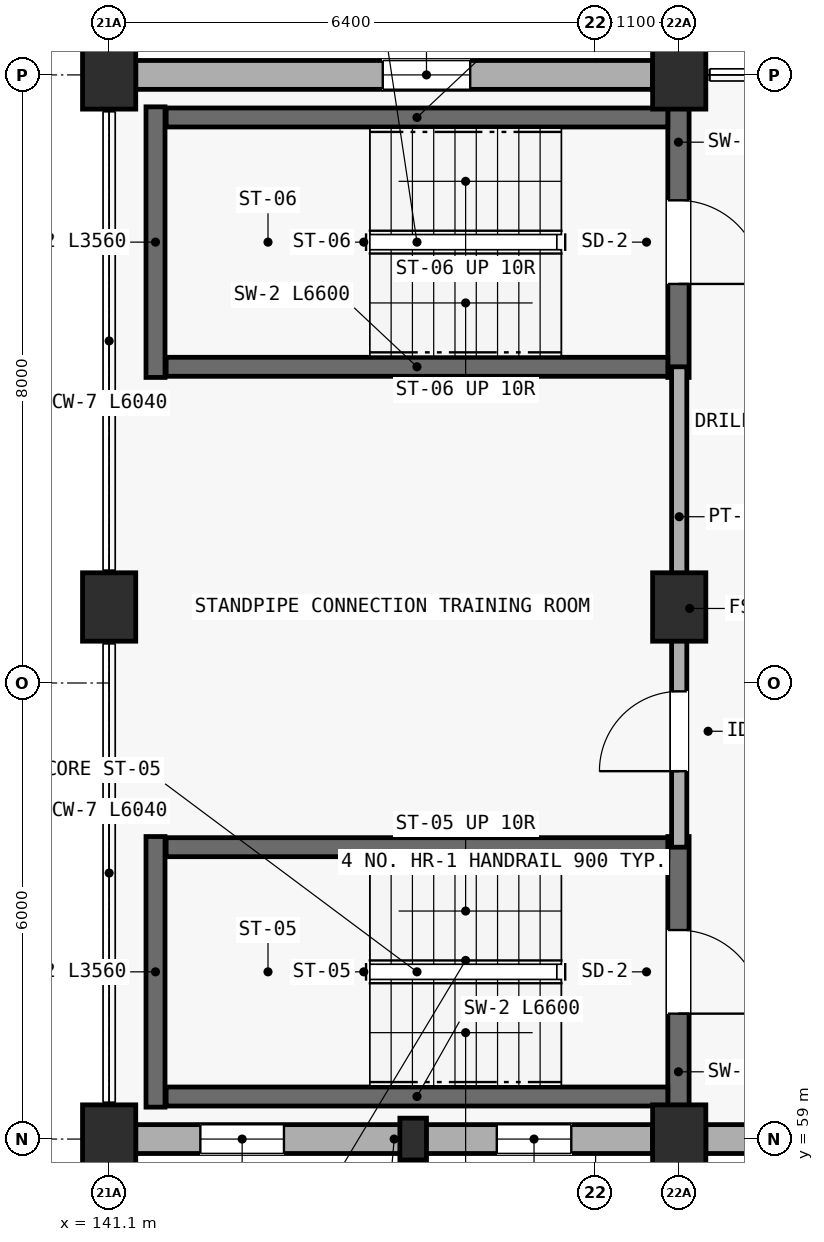
"""IFC4 building model, lengths in metres.
Left out: names, types, materials, properties, quantities, classifications, styles, units other than length and angle.
Written with IfcOpenShell. Run it as: python <this file> out.ifc"""

import sys

from ifc_helpers import new_model, si_unit, direction, frame, frame_2d, origin, origin_2d, place, context, subcontext, project, spatial, rectangle, extrude, element, fill, save


model = new_model("IFC4")
c1 = context("Model", 3, precision=1e-05, world=origin(), true_north=direction((0.0, 1.0)))
c2 = subcontext(c1, "Body", "Model", "MODEL_VIEW")
j1 = project(units=[si_unit("LENGTHUNIT", "METRE"), si_unit("PLANEANGLEUNIT", "RADIAN")], contexts=[c1])
p1 = place(None, origin())
s1 = spatial("IfcSite", under=j1, at=p1, CompositionType="ELEMENT")
p2 = place(p1, origin())
s2 = spatial("IfcBuilding", under=s1, at=p2, CompositionType="ELEMENT")
p3 = place(p2, frame((0.0, 0.0, 5.85)))
s3 = spatial("IfcBuildingStorey", under=s2, at=p3, CompositionType="ELEMENT", Elevation=5.85)
for number, where, z_axis, x_axis in (
    (1, (141.1, 59.0, 0.0), (0.0, 0.0, 1.0), (1.0, 0.0, 0.0)),
    (2, (141.1, 66.0, 0.0), (0.0, 0.0, 1.0), (1.0, 0.0, 0.0)),
    (3, (141.1, 73.0, 0.0), (0.0, 0.0, 1.0), (1.0, 0.0, 0.0)),
    (4, (148.6, 59.0, 0.0), (0.0, 0.0, 1.0), (1.0, 0.0, 0.0)),
    (5, (148.6, 66.0, 0.0), (0.0, 0.0, 1.0), (1.0, 0.0, 0.0)),
    (6, (148.6, 73.0, 0.0), (0.0, 0.0, 1.0), (1.0, 0.0, 0.0)),
):
    element("IfcColumn", number, at=place(p3, frame(where, z_axis=z_axis, x_axis=x_axis)), inside=s3, PredefinedType="COLUMN", context=c2, shape_type="SweptSolid", body=[
        extrude(rectangle(XDim=0.7, YDim=0.9, at=origin_2d()), origin(), (0.0, 0.0, 1.0), 3.45),
    ])
p4 = place(p3, frame((145.1, 59.0, 0.0), z_axis=(0.0, 0.0, 1.0), x_axis=(1.0, 0.0, 0.0)))
e7 = element("IfcColumn", 7, at=p4, inside=s3, PredefinedType="PILASTER", context=c2, shape_type="SweptSolid", body=[
    extrude(rectangle(XDim=0.35, YDim=0.55, at=origin_2d()), origin(), (0.0, 0.0, 1.0), 3.45),
])
p5 = place(p3, frame((141.45, 59.0, 0.0), z_axis=(0.0, 0.0, 1.0), x_axis=(1.0, 0.0, 0.0)))
e8 = element("IfcWall", 8, at=p5, inside=s3, PredefinedType="STANDARD", context=c2, shape_type="SweptSolid", body=[
    extrude(rectangle(XDim=6.8, YDim=0.38, at=frame_2d((3.4, 0.0))), origin(), (0.0, 0.0, 1.0), 2.75),
])
p6 = place(p5, frame((0.85, 0.0, 0.75)))
e9 = element("IfcOpeningElement", 9, at=p6, cuts=e8, PredefinedType="OPENING", context=c2, shape_type="SweptSolid", body=[
    extrude(rectangle(XDim=1.1, YDim=1.35, at=frame_2d((0.55, 0.675))), frame((0.0, 0.2, 0.0), z_axis=(0.0, -1.0, 0.0), x_axis=(1.0, 0.0, 0.0)), (0.0, 0.0, 1.0), 0.4),
])
p7 = place(p5, frame((4.75, 0.0, 0.75)))
e10 = element("IfcOpeningElement", 10, at=p7, cuts=e8, PredefinedType="OPENING", context=c2, shape_type="SweptSolid", body=[
    extrude(rectangle(XDim=0.98, YDim=1.45, at=frame_2d((0.49, 0.725))), frame((0.0, 0.2, 0.0), z_axis=(0.0, -1.0, 0.0), x_axis=(1.0, 0.0, 0.0)), (0.0, 0.0, 1.0), 0.4),
])
p8 = place(p3, frame((148.95, 59.0, 0.0), z_axis=(0.0, 0.0, 1.0), x_axis=(1.0, 0.0, 0.0)))
e11 = element("IfcWall", 11, at=p8, inside=s3, PredefinedType="STANDARD", context=c2, shape_type="SweptSolid", body=[
    extrude(rectangle(XDim=11.7, YDim=0.38, at=frame_2d((5.85, 0.0))), origin(), (0.0, 0.0, 1.0), 2.75),
])
p9 = place(p8, frame((2.2, 0.0, 0.75)))
e12 = element("IfcOpeningElement", 12, at=p9, cuts=e11, PredefinedType="OPENING", context=c2, shape_type="SweptSolid", body=[
    extrude(rectangle(XDim=0.95, YDim=1.35, at=frame_2d((0.475, 0.675))), frame((0.0, 0.2, 0.0), z_axis=(0.0, -1.0, 0.0), x_axis=(1.0, 0.0, 0.0)), (0.0, 0.0, 1.0), 0.4),
])
p10 = place(p8, frame((5.8, 0.0, 0.75)))
e13 = element("IfcOpeningElement", 13, at=p10, cuts=e11, PredefinedType="OPENING", context=c2, shape_type="SweptSolid", body=[
    extrude(rectangle(XDim=0.95, YDim=1.35, at=frame_2d((0.475, 0.675))), frame((0.0, 0.2, 0.0), z_axis=(0.0, -1.0, 0.0), x_axis=(1.0, 0.0, 0.0)), (0.0, 0.0, 1.0), 0.4),
])
p11 = place(p3, frame((148.25, 73.0, 0.0), z_axis=(0.0, 0.0, 1.0), x_axis=(-1.0, 0.0, 0.0)))
e14 = element("IfcWall", 14, at=p11, inside=s3, PredefinedType="STANDARD", context=c2, shape_type="SweptSolid", body=[
    extrude(rectangle(XDim=6.8, YDim=0.38, at=frame_2d((3.4, 0.0))), origin(), (0.0, 0.0, 1.0), 2.75),
])
p12 = place(p11, frame((2.4, 0.0, 0.75)))
e15 = element("IfcOpeningElement", 15, at=p12, cuts=e14, PredefinedType="OPENING", context=c2, shape_type="SweptSolid", body=[
    extrude(rectangle(XDim=1.15, YDim=1.45, at=frame_2d((0.575, 0.725))), frame((0.0, 0.2, 0.0), z_axis=(0.0, -1.0, 0.0), x_axis=(1.0, 0.0, 0.0)), (0.0, 0.0, 1.0), 0.4),
])
p13 = place(p3, frame((148.59, 62.98, 0.0), z_axis=(0.0, 0.0, 1.0), x_axis=(0.0, -1.0, 0.0)))
e16 = element("IfcWall", 16, at=p13, inside=s3, PredefinedType="SHEAR", context=c2, shape_type="SweptSolid", body=[
    extrude(rectangle(XDim=3.56, YDim=0.28, at=frame_2d((1.78, 0.0))), origin(), (0.0, 0.0, 1.0), 3.2),
])
p14 = place(p13, frame((1.23, 0.0, 0.0)))
e17 = element("IfcOpeningElement", 17, at=p14, cuts=e16, PredefinedType="OPENING", context=c2, shape_type="SweptSolid", body=[
    extrude(rectangle(XDim=1.1, YDim=2.15, at=frame_2d((0.55, 1.075))), frame((0.0, 0.15, 0.0), z_axis=(0.0, -1.0, 0.0), x_axis=(1.0, 0.0, 0.0)), (0.0, 0.0, 1.0), 0.3),
])
p15 = place(p3, frame((141.71, 59.42, 0.0), z_axis=(0.0, 0.0, 1.0), x_axis=(0.0, 1.0, 0.0)))
e18 = element("IfcWall", 18, at=p15, inside=s3, PredefinedType="SHEAR", context=c2, shape_type="SweptSolid", body=[
    extrude(rectangle(XDim=3.56, YDim=0.25, at=frame_2d((1.78, 0.0))), origin(), (0.0, 0.0, 1.0), 3.2),
])
for number, where, z_axis, x_axis in (
    (19, (148.45, 62.84, 0.0), (0.0, 0.0, 1.0), (-1.0, 0.0, 0.0)),
    (20, (141.85, 59.56, 0.0), (0.0, 0.0, 1.0), (1.0, 0.0, 0.0)),
):
    element("IfcWall", number, at=place(p3, frame(where, z_axis=z_axis, x_axis=x_axis)), inside=s3, PredefinedType="SHEAR", context=c2, shape_type="SweptSolid", body=[
        extrude(rectangle(XDim=6.6, YDim=0.25, at=frame_2d((3.3, 0.0))), origin(), (0.0, 0.0, 1.0), 3.2),
    ])
p16 = place(p3, frame((148.59, 72.58, 0.0), z_axis=(0.0, 0.0, 1.0), x_axis=(0.0, -1.0, 0.0)))
e21 = element("IfcWall", 21, at=p16, inside=s3, PredefinedType="SHEAR", context=c2, shape_type="SweptSolid", body=[
    extrude(rectangle(XDim=3.56, YDim=0.28, at=frame_2d((1.78, 0.0))), origin(), (0.0, 0.0, 1.0), 3.2),
])
p17 = place(p16, frame((1.23, 0.0, 0.0)))
e22 = element("IfcOpeningElement", 22, at=p17, cuts=e21, PredefinedType="OPENING", context=c2, shape_type="SweptSolid", body=[
    extrude(rectangle(XDim=1.1, YDim=2.15, at=frame_2d((0.55, 1.075))), frame((0.0, 0.15, 0.0), z_axis=(0.0, -1.0, 0.0), x_axis=(1.0, 0.0, 0.0)), (0.0, 0.0, 1.0), 0.3),
])
p18 = place(p3, frame((141.71, 69.02, 0.0), z_axis=(0.0, 0.0, 1.0), x_axis=(0.0, 1.0, 0.0)))
e23 = element("IfcWall", 23, at=p18, inside=s3, PredefinedType="SHEAR", context=c2, shape_type="SweptSolid", body=[
    extrude(rectangle(XDim=3.56, YDim=0.25, at=frame_2d((1.78, 0.0))), origin(), (0.0, 0.0, 1.0), 3.2),
])
for number, where, z_axis, x_axis in (
    (24, (148.45, 72.44, 0.0), (0.0, 0.0, 1.0), (-1.0, 0.0, 0.0)),
    (25, (141.85, 69.16, 0.0), (0.0, 0.0, 1.0), (1.0, 0.0, 0.0)),
):
    element("IfcWall", number, at=place(p3, frame(where, z_axis=z_axis, x_axis=x_axis)), inside=s3, PredefinedType="SHEAR", context=c2, shape_type="SweptSolid", body=[
        extrude(rectangle(XDim=6.6, YDim=0.25, at=frame_2d((3.3, 0.0))), origin(), (0.0, 0.0, 1.0), 3.2),
    ])
p19 = place(p3, frame((148.6, 62.84, 0.0), z_axis=(0.0, 0.0, 1.0), x_axis=(0.0, 1.0, 0.0)))
e26 = element("IfcWall", 26, at=p19, inside=s3, PredefinedType="PARTITIONING", context=c2, shape_type="SweptSolid", body=[
    extrude(rectangle(XDim=6.32, YDim=0.2, at=frame_2d((3.16, 0.0))), origin(), (0.0, 0.0, 1.0), 2.7),
])
p20 = place(p19, frame((1.0, 0.0, 0.0)))
e27 = element("IfcOpeningElement", 27, at=p20, cuts=e26, PredefinedType="OPENING", context=c2, shape_type="SweptSolid", body=[
    extrude(rectangle(XDim=1.05, YDim=2.14, at=frame_2d((0.525, 1.07))), frame((0.0, 0.11, 0.0), z_axis=(0.0, -1.0, 0.0), x_axis=(1.0, 0.0, 0.0)), (0.0, 0.0, 1.0), 0.22),
])
p21 = place(p6, origin())
e28 = element("IfcWindow", 28, at=p21, inside=s3, PartitioningType="SINGLE_PANEL", PredefinedType="WINDOW", context=c2, shape_type="SweptSolid", body=[
    extrude(rectangle(XDim=1.1, YDim=1.35, at=frame_2d((0.55, 0.675))), frame((0.0, 0.03, 0.0), z_axis=(0.0, -1.0, 0.0), x_axis=(1.0, 0.0, 0.0)), (0.0, 0.0, 1.0), 0.06),
])
fill(e9, e28)
p22 = place(p7, origin())
e29 = element("IfcWindow", 29, at=p22, inside=s3, PartitioningType="SINGLE_PANEL", PredefinedType="WINDOW", context=c2, shape_type="SweptSolid", body=[
    extrude(rectangle(XDim=0.98, YDim=1.45, at=frame_2d((0.49, 0.725))), frame((0.0, 0.03, 0.0), z_axis=(0.0, -1.0, 0.0), x_axis=(1.0, 0.0, 0.0)), (0.0, 0.0, 1.0), 0.06),
])
fill(e10, e29)
p23 = place(p12, origin())
e30 = element("IfcWindow", 30, at=p23, inside=s3, PartitioningType="SINGLE_PANEL", PredefinedType="WINDOW", context=c2, shape_type="SweptSolid", body=[
    extrude(rectangle(XDim=1.15, YDim=1.45, at=frame_2d((0.575, 0.725))), frame((0.0, 0.03, 0.0), z_axis=(0.0, -1.0, 0.0), x_axis=(1.0, 0.0, 0.0)), (0.0, 0.0, 1.0), 0.06),
])
fill(e15, e30)
p24 = place(p14, origin())
e31 = element("IfcDoor", 31, at=p24, inside=s3, OperationType="SINGLE_SWING_RIGHT", PredefinedType="DOOR", context=c2, shape_type="SweptSolid", body=[
    extrude(rectangle(XDim=1.1, YDim=2.15, at=frame_2d((0.55, 1.075))), frame((0.0, 0.025, 0.0), z_axis=(0.0, -1.0, 0.0), x_axis=(1.0, 0.0, 0.0)), (0.0, 0.0, 1.0), 0.05),
])
fill(e17, e31)
p25 = place(p17, origin())
e32 = element("IfcDoor", 32, at=p25, inside=s3, OperationType="SINGLE_SWING_RIGHT", PredefinedType="DOOR", context=c2, shape_type="SweptSolid", body=[
    extrude(rectangle(XDim=1.1, YDim=2.15, at=frame_2d((0.55, 1.075))), frame((0.0, 0.025, 0.0), z_axis=(0.0, -1.0, 0.0), x_axis=(1.0, 0.0, 0.0)), (0.0, 0.0, 1.0), 0.05),
])
fill(e22, e32)
p26 = place(p20, origin())
e33 = element("IfcDoor", 33, at=p26, inside=s3, OperationType="SINGLE_SWING_LEFT", PredefinedType="DOOR", context=c2, shape_type="SweptSolid", body=[
    extrude(rectangle(XDim=1.05, YDim=2.14, at=frame_2d((0.525, 1.07))), frame((0.0, 0.025, 0.0), z_axis=(0.0, -1.0, 0.0), x_axis=(1.0, 0.0, 0.0)), (0.0, 0.0, 1.0), 0.05),
])
fill(e27, e33)
save(model, sys.argv[1])
